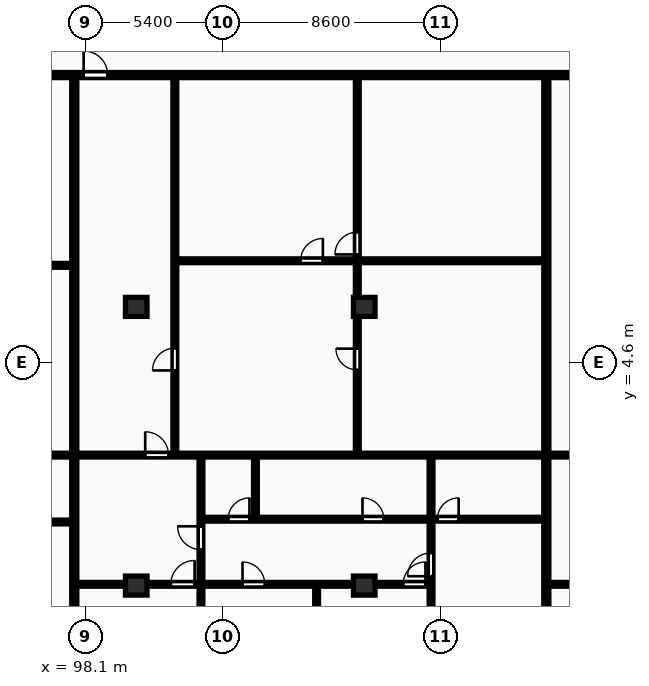
"""IFC4 building model, lengths in metres.
Left out: names, types, materials, properties, quantities, classifications, styles, units other than length and angle.
Written with IfcOpenShell. Run it as: python <this file> out.ifc"""

import sys

from ifc_helpers import new_model, si_unit, direction, frame, frame_2d, origin, origin_2d, place, context, subcontext, project, spatial, rectangle, extrude, element, fill, save


model = new_model("IFC4")
c1 = context("Model", 3, precision=1e-05, world=origin(), true_north=direction((0.0, 1.0)))
c2 = subcontext(c1, "Body", "Model", "MODEL_VIEW")
j1 = project(units=[si_unit("LENGTHUNIT", "METRE"), si_unit("PLANEANGLEUNIT", "RADIAN")], contexts=[c1])
p1 = place(None, origin())
s1 = spatial("IfcSite", under=j1, at=p1, CompositionType="ELEMENT")
p2 = place(p1, origin())
s2 = spatial("IfcBuilding", under=s1, at=p2, CompositionType="ELEMENT")
p3 = place(p2, frame((0.0, 0.0, 132.8)))
s3 = spatial("IfcBuildingStorey", under=s2, at=p3, CompositionType="ELEMENT", Elevation=132.8)
for number, where, z_axis, x_axis in (
    (1, (100.1, -4.2, 0.0), (0.0, 0.0, 1.0), (1.0, 0.0, 0.0)),
    (2, (100.1, 6.8, 0.0), (0.0, 0.0, 1.0), (1.0, 0.0, 0.0)),
    (3, (109.1, -4.2, 0.0), (0.0, 0.0, 1.0), (1.0, 0.0, 0.0)),
    (4, (109.1, 6.8, 0.0), (0.0, 0.0, 1.0), (1.0, 0.0, 0.0)),
):
    element("IfcColumn", number, at=place(p3, frame(where, z_axis=z_axis, x_axis=x_axis)), inside=s3, PredefinedType="COLUMN", context=c2, shape_type="SweptSolid", body=[
        extrude(rectangle(XDim=0.85, YDim=0.75, at=origin_2d()), origin(), (0.0, 0.0, 1.0), 3.25),
    ])
p4 = place(p3, frame((97.655, -8.7, 0.0), z_axis=(0.0, 0.0, 1.0), x_axis=(0.0, 1.0, 0.0)))
e5 = element("IfcWall", 5, at=p4, inside=s3, PredefinedType="PARTITIONING", context=c2, shape_type="SweptSolid", body=[
    extrude(rectangle(XDim=24.57, YDim=0.2, at=frame_2d((12.285, 0.0))), origin(), (0.0, 0.0, 1.0), 2.97),
])
p5 = place(p3, frame((76.73, 8.44, 0.0), z_axis=(0.0, 0.0, 1.0), x_axis=(1.0, 0.0, 0.0)))
e6 = element("IfcWall", 6, at=p5, inside=s3, PredefinedType="PARTITIONING", context=c2, shape_type="SweptSolid", body=[
    extrude(rectangle(XDim=20.844, YDim=0.15, at=frame_2d((10.422, 0.0))), origin(), (0.0, 0.0, 1.0), 2.97),
])
p6 = place(p5, frame((9.241, 0.0, 0.0)))
e7 = element("IfcOpeningElement", 7, at=p6, cuts=e6, PredefinedType="OPENING", context=c2, shape_type="SweptSolid", body=[
    extrude(rectangle(XDim=0.88, YDim=2.06, at=frame_2d((0.44, 1.03))), frame((0.0, 0.085, 0.0), z_axis=(0.0, -1.0, 0.0), x_axis=(1.0, 0.0, 0.0)), (0.0, 0.0, 1.0), 0.17),
])
p7 = place(p3, frame((77.53, -1.69, 0.0), z_axis=(0.0, 0.0, 1.0), x_axis=(1.0, 0.0, 0.0)))
e8 = element("IfcWall", 8, at=p7, inside=s3, PredefinedType="PARTITIONING", context=c2, shape_type="SweptSolid", body=[
    extrude(rectangle(XDim=20.044, YDim=0.15, at=frame_2d((10.022, 0.0))), origin(), (0.0, 0.0, 1.0), 2.97),
])
p8 = place(p7, frame((1.191, 0.0, 0.0)))
e9 = element("IfcOpeningElement", 9, at=p8, cuts=e8, PredefinedType="OPENING", context=c2, shape_type="SweptSolid", body=[
    extrude(rectangle(XDim=0.84, YDim=2.04, at=frame_2d((0.42, 1.02))), frame((0.0, 0.085, 0.0), z_axis=(0.0, -1.0, 0.0), x_axis=(1.0, 0.0, 0.0)), (0.0, 0.0, 1.0), 0.17),
])
p9 = place(p7, frame((9.602, 0.0, 0.0)))
e10 = element("IfcOpeningElement", 10, at=p9, cuts=e8, PredefinedType="OPENING", context=c2, shape_type="SweptSolid", body=[
    extrude(rectangle(XDim=0.84, YDim=2.04, at=frame_2d((0.42, 1.02))), frame((0.0, 0.085, 0.0), z_axis=(0.0, -1.0, 0.0), x_axis=(1.0, 0.0, 0.0)), (0.0, 0.0, 1.0), 0.17),
])
p10 = place(p7, frame((15.7, 0.0, 0.0)))
e11 = element("IfcOpeningElement", 11, at=p10, cuts=e8, PredefinedType="OPENING", context=c2, shape_type="SweptSolid", body=[
    extrude(rectangle(XDim=0.84, YDim=2.04, at=frame_2d((0.42, 1.02))), frame((0.0, 0.085, 0.0), z_axis=(0.0, -1.0, 0.0), x_axis=(1.0, 0.0, 0.0)), (0.0, 0.0, 1.0), 0.17),
])
p11 = place(p3, frame((72.78, 0.95, 0.0), z_axis=(0.0, 0.0, 1.0), x_axis=(1.0, 0.0, 0.0)))
e12 = element("IfcWall", 12, at=p11, inside=s3, PredefinedType="PARTITIONING", context=c2, shape_type="SweptSolid", body=[
    extrude(rectangle(XDim=24.794, YDim=0.15, at=frame_2d((12.397, 0.0))), origin(), (0.0, 0.0, 1.0), 2.97),
])
p12 = place(p11, frame((2.72, 0.0, 0.0)))
e13 = element("IfcOpeningElement", 13, at=p12, cuts=e12, PredefinedType="OPENING", context=c2, shape_type="SweptSolid", body=[
    extrude(rectangle(XDim=0.92, YDim=2.08, at=frame_2d((0.46, 1.04))), frame((0.0, 0.085, 0.0), z_axis=(0.0, -1.0, 0.0), x_axis=(1.0, 0.0, 0.0)), (0.0, 0.0, 1.0), 0.17),
])
p13 = place(p3, frame((116.286, -8.7, 0.0), z_axis=(0.0, 0.0, 1.0), x_axis=(0.0, 1.0, 0.0)))
e14 = element("IfcWall", 14, at=p13, inside=s3, PredefinedType="PARTITIONING", context=c2, shape_type="SweptSolid", body=[
    extrude(rectangle(XDim=24.57, YDim=0.2, at=frame_2d((12.285, 0.0))), origin(), (0.0, 0.0, 1.0), 2.97),
])
p14 = place(p3, frame((108.825, 0.99, 0.0), z_axis=(0.0, 0.0, 1.0), x_axis=(0.0, 1.0, 0.0)))
e15 = element("IfcWall", 15, at=p14, inside=s3, PredefinedType="PARTITIONING", context=c2, shape_type="SweptSolid", body=[
    extrude(rectangle(XDim=14.9, YDim=0.15, at=frame_2d((7.45, 0.0))), origin(), (0.0, 0.0, 1.0), 2.97),
])
p15 = place(p14, frame((3.321, 0.0, 0.0)))
e16 = element("IfcOpeningElement", 16, at=p15, cuts=e15, PredefinedType="OPENING", context=c2, shape_type="SweptSolid", body=[
    extrude(rectangle(XDim=0.84, YDim=2.04, at=frame_2d((0.42, 1.02))), frame((0.0, 0.085, 0.0), z_axis=(0.0, -1.0, 0.0), x_axis=(1.0, 0.0, 0.0)), (0.0, 0.0, 1.0), 0.17),
])
p16 = place(p14, frame((7.88, 0.0, 0.0)))
e17 = element("IfcOpeningElement", 17, at=p16, cuts=e15, PredefinedType="OPENING", context=c2, shape_type="SweptSolid", body=[
    extrude(rectangle(XDim=0.88, YDim=2.06, at=frame_2d((0.44, 1.03))), frame((0.0, 0.085, 0.0), z_axis=(0.0, -1.0, 0.0), x_axis=(1.0, 0.0, 0.0)), (0.0, 0.0, 1.0), 0.17),
])
p17 = place(p3, frame((101.685, 8.62, 0.0), z_axis=(0.0, 0.0, 1.0), x_axis=(1.0, 0.0, 0.0)))
e18 = element("IfcWall", 18, at=p17, inside=s3, PredefinedType="PARTITIONING", context=c2, shape_type="SweptSolid", body=[
    extrude(rectangle(XDim=14.522, YDim=0.15, at=frame_2d((7.261, 0.0))), origin(), (0.0, 0.0, 1.0), 2.97),
])
p18 = place(p17, frame((4.903, 0.0, 0.0)))
e19 = element("IfcOpeningElement", 19, at=p18, cuts=e18, PredefinedType="OPENING", context=c2, shape_type="SweptSolid", body=[
    extrude(rectangle(XDim=0.88, YDim=2.06, at=frame_2d((0.44, 1.03))), frame((0.0, 0.085, 0.0), z_axis=(0.0, -1.0, 0.0), x_axis=(1.0, 0.0, 0.0)), (0.0, 0.0, 1.0), 0.17),
])
p19 = place(p3, frame((101.625, 0.99, 0.0), z_axis=(0.0, 0.0, 1.0), x_axis=(0.0, 1.0, 0.0)))
e20 = element("IfcWall", 20, at=p19, inside=s3, PredefinedType="PARTITIONING", context=c2, shape_type="SweptSolid", body=[
    extrude(rectangle(XDim=14.9, YDim=0.15, at=frame_2d((7.45, 0.0))), origin(), (0.0, 0.0, 1.0), 2.97),
])
p20 = place(p19, frame((3.302, 0.0, 0.0)))
e21 = element("IfcOpeningElement", 21, at=p20, cuts=e20, PredefinedType="OPENING", context=c2, shape_type="SweptSolid", body=[
    extrude(rectangle(XDim=0.88, YDim=2.06, at=frame_2d((0.44, 1.03))), frame((0.0, 0.085, 0.0), z_axis=(0.0, -1.0, 0.0), x_axis=(1.0, 0.0, 0.0)), (0.0, 0.0, 1.0), 0.17),
])
p21 = place(p3, frame((104.804, -1.56, 0.0), z_axis=(0.0, 0.0, 1.0), x_axis=(0.0, 1.0, 0.0)))
e22 = element("IfcWall", 22, at=p21, inside=s3, PredefinedType="PARTITIONING", context=c2, shape_type="SweptSolid", body=[
    extrude(rectangle(XDim=2.47, YDim=0.15, at=frame_2d((1.235, 0.0))), origin(), (0.0, 0.0, 1.0), 2.97),
])
p22 = place(p3, frame((107.22, -8.7, 0.0), z_axis=(0.0, 0.0, 1.0), x_axis=(0.0, 1.0, 0.0)))
e23 = element("IfcWall", 23, at=p22, inside=s3, PredefinedType="PARTITIONING", context=c2, shape_type="SweptSolid", body=[
    extrude(rectangle(XDim=4.47, YDim=0.15, at=frame_2d((2.235, 0.0))), origin(), (0.0, 0.0, 1.0), 2.97),
])
p23 = place(p3, frame((102.655, -8.7, 0.0), z_axis=(0.0, 0.0, 1.0), x_axis=(0.0, 1.0, 0.0)))
e24 = element("IfcWall", 24, at=p23, inside=s3, PredefinedType="PARTITIONING", context=c2, shape_type="SweptSolid", body=[
    extrude(rectangle(XDim=9.61, YDim=0.15, at=frame_2d((4.805, 0.0))), origin(), (0.0, 0.0, 1.0), 2.97),
])
p24 = place(p23, frame((5.92, 0.0, 0.0)))
e25 = element("IfcOpeningElement", 25, at=p24, cuts=e24, PredefinedType="OPENING", context=c2, shape_type="SweptSolid", body=[
    extrude(rectangle(XDim=0.92, YDim=2.08, at=frame_2d((0.46, 1.04))), frame((0.0, 0.085, 0.0), z_axis=(0.0, -1.0, 0.0), x_axis=(1.0, 0.0, 0.0)), (0.0, 0.0, 1.0), 0.17),
])
p25 = place(p3, frame((111.736, -1.56, 0.0), z_axis=(0.0, 0.0, 1.0), x_axis=(0.0, 1.0, 0.0)))
e26 = element("IfcWall", 26, at=p25, inside=s3, PredefinedType="PARTITIONING", context=c2, shape_type="SweptSolid", body=[
    extrude(rectangle(XDim=2.47, YDim=0.15, at=frame_2d((1.235, 0.0))), origin(), (0.0, 0.0, 1.0), 2.97),
])
p26 = place(p3, frame((111.736, -8.7, 0.0), z_axis=(0.0, 0.0, 1.0), x_axis=(0.0, 1.0, 0.0)))
e27 = element("IfcWall", 27, at=p26, inside=s3, PredefinedType="PARTITIONING", context=c2, shape_type="SweptSolid", body=[
    extrude(rectangle(XDim=7.1, YDim=0.15, at=frame_2d((3.55, 0.0))), origin(), (0.0, 0.0, 1.0), 2.97),
])
p27 = place(p26, frame((4.87, 0.0, 0.0)))
e28 = element("IfcOpeningElement", 28, at=p27, cuts=e27, PredefinedType="OPENING", context=c2, shape_type="SweptSolid", body=[
    extrude(rectangle(XDim=0.92, YDim=2.08, at=frame_2d((0.46, 1.04))), frame((0.0, 0.085, 0.0), z_axis=(0.0, -1.0, 0.0), x_axis=(1.0, 0.0, 0.0)), (0.0, 0.0, 1.0), 0.17),
])
p28 = place(p3, frame((102.695, -1.58, 0.0), z_axis=(0.0, 0.0, 1.0), x_axis=(1.0, 0.0, 0.0)))
e29 = element("IfcWall", 29, at=p28, inside=s3, PredefinedType="PARTITIONING", context=c2, shape_type="SweptSolid", body=[
    extrude(rectangle(XDim=13.512, YDim=0.15, at=frame_2d((6.756, 0.0))), origin(), (0.0, 0.0, 1.0), 2.97),
])
p29 = place(p28, frame((1.034, 0.0, 0.0)))
e30 = element("IfcOpeningElement", 30, at=p29, cuts=e29, PredefinedType="OPENING", context=c2, shape_type="SweptSolid", body=[
    extrude(rectangle(XDim=0.84, YDim=2.04, at=frame_2d((0.42, 1.02))), frame((0.0, 0.085, 0.0), z_axis=(0.0, -1.0, 0.0), x_axis=(1.0, 0.0, 0.0)), (0.0, 0.0, 1.0), 0.17),
])
p30 = place(p28, frame((6.336, 0.0, 0.0)))
e31 = element("IfcOpeningElement", 31, at=p30, cuts=e29, PredefinedType="OPENING", context=c2, shape_type="SweptSolid", body=[
    extrude(rectangle(XDim=0.84, YDim=2.04, at=frame_2d((0.42, 1.02))), frame((0.0, 0.085, 0.0), z_axis=(0.0, -1.0, 0.0), x_axis=(1.0, 0.0, 0.0)), (0.0, 0.0, 1.0), 0.17),
])
p31 = place(p28, frame((9.292, 0.0, 0.0)))
e32 = element("IfcOpeningElement", 32, at=p31, cuts=e29, PredefinedType="OPENING", context=c2, shape_type="SweptSolid", body=[
    extrude(rectangle(XDim=0.84, YDim=2.04, at=frame_2d((0.42, 1.02))), frame((0.0, 0.085, 0.0), z_axis=(0.0, -1.0, 0.0), x_axis=(1.0, 0.0, 0.0)), (0.0, 0.0, 1.0), 0.17),
])
p32 = place(p3, frame((97.735, 0.95, 0.0), z_axis=(0.0, 0.0, 1.0), x_axis=(1.0, 0.0, 0.0)))
e33 = element("IfcWall", 33, at=p32, inside=s3, PredefinedType="PARTITIONING", context=c2, shape_type="SweptSolid", body=[
    extrude(rectangle(XDim=18.472, YDim=0.15, at=frame_2d((9.236, 0.0))), origin(), (0.0, 0.0, 1.0), 2.97),
])
p33 = place(p32, frame((2.72, 0.0, 0.0)))
e34 = element("IfcOpeningElement", 34, at=p33, cuts=e33, PredefinedType="OPENING", context=c2, shape_type="SweptSolid", body=[
    extrude(rectangle(XDim=0.92, YDim=2.08, at=frame_2d((0.46, 1.04))), frame((0.0, 0.085, 0.0), z_axis=(0.0, -1.0, 0.0), x_axis=(1.0, 0.0, 0.0)), (0.0, 0.0, 1.0), 0.17),
])
p34 = place(p3, frame((97.735, -4.15, 0.0), z_axis=(0.0, 0.0, 1.0), x_axis=(1.0, 0.0, 0.0)))
e35 = element("IfcWall", 35, at=p34, inside=s3, PredefinedType="PARTITIONING", context=c2, shape_type="SweptSolid", body=[
    extrude(rectangle(XDim=14.002, YDim=0.15, at=frame_2d((7.001, 0.0))), origin(), (0.0, 0.0, 1.0), 2.663),
])
p35 = place(p34, frame((3.73, 0.0, 0.0)))
e36 = element("IfcOpeningElement", 36, at=p35, cuts=e35, PredefinedType="OPENING", context=c2, shape_type="SweptSolid", body=[
    extrude(rectangle(XDim=0.94, YDim=2.1, at=frame_2d((0.47, 1.05))), frame((0.0, 0.085, 0.0), z_axis=(0.0, -1.0, 0.0), x_axis=(1.0, 0.0, 0.0)), (0.0, 0.0, 1.0), 0.17),
])
p36 = place(p34, frame((6.561, 0.0, 0.0)))
e37 = element("IfcOpeningElement", 37, at=p36, cuts=e35, PredefinedType="OPENING", context=c2, shape_type="SweptSolid", body=[
    extrude(rectangle(XDim=0.88, YDim=2.06, at=frame_2d((0.44, 1.03))), frame((0.0, 0.085, 0.0), z_axis=(0.0, -1.0, 0.0), x_axis=(1.0, 0.0, 0.0)), (0.0, 0.0, 1.0), 0.17),
])
p37 = place(p34, frame((12.902, 0.0, 0.0)))
e38 = element("IfcOpeningElement", 38, at=p37, cuts=e35, PredefinedType="OPENING", context=c2, shape_type="SweptSolid", body=[
    extrude(rectangle(XDim=0.88, YDim=2.06, at=frame_2d((0.44, 1.03))), frame((0.0, 0.085, 0.0), z_axis=(0.0, -1.0, 0.0), x_axis=(1.0, 0.0, 0.0)), (0.0, 0.0, 1.0), 0.17),
])
p38 = place(p3, frame((116.366, 0.95, 0.0), z_axis=(0.0, 0.0, 1.0), x_axis=(1.0, 0.0, 0.0)))
e39 = element("IfcWall", 39, at=p38, inside=s3, PredefinedType="PARTITIONING", context=c2, shape_type="SweptSolid", body=[
    extrude(rectangle(XDim=14.254, YDim=0.15, at=frame_2d((7.127, 0.0))), origin(), (0.0, 0.0, 1.0), 2.97),
])
p39 = place(p38, frame((2.72, 0.0, 0.0)))
e40 = element("IfcOpeningElement", 40, at=p39, cuts=e39, PredefinedType="OPENING", context=c2, shape_type="SweptSolid", body=[
    extrude(rectangle(XDim=0.92, YDim=2.08, at=frame_2d((0.46, 1.04))), frame((0.0, 0.085, 0.0), z_axis=(0.0, -1.0, 0.0), x_axis=(1.0, 0.0, 0.0)), (0.0, 0.0, 1.0), 0.17),
])
p40 = place(p3, frame((116.366, -4.15, 0.0), z_axis=(0.0, 0.0, 1.0), x_axis=(1.0, 0.0, 0.0)))
e41 = element("IfcWall", 41, at=p40, inside=s3, PredefinedType="PARTITIONING", context=c2, shape_type="SweptSolid", body=[
    extrude(rectangle(XDim=14.254, YDim=0.15, at=frame_2d((7.127, 0.0))), origin(), (0.0, 0.0, 1.0), 2.663),
])
p41 = place(p40, frame((4.673, 0.0, 0.0)))
e42 = element("IfcOpeningElement", 42, at=p41, cuts=e41, PredefinedType="OPENING", context=c2, shape_type="SweptSolid", body=[
    extrude(rectangle(XDim=0.94, YDim=2.1, at=frame_2d((0.47, 1.05))), frame((0.0, 0.085, 0.0), z_axis=(0.0, -1.0, 0.0), x_axis=(1.0, 0.0, 0.0)), (0.0, 0.0, 1.0), 0.17),
])
p42 = place(p3, frame((72.7, 15.95, 0.0), z_axis=(0.0, 0.0, 1.0), x_axis=(1.0, 0.0, 0.0)))
e43 = element("IfcWall", 43, at=p42, inside=s3, PredefinedType="PARTITIONING", context=c2, shape_type="SweptSolid", body=[
    extrude(rectangle(XDim=58.0, YDim=0.2, at=frame_2d((29.0, 0.0))), origin(), (0.0, 0.0, 1.0), 2.97),
])
p43 = place(p42, frame((2.77, 0.0, 0.0)))
e44 = element("IfcOpeningElement", 44, at=p43, cuts=e43, PredefinedType="OPENING", context=c2, shape_type="SweptSolid", body=[
    extrude(rectangle(XDim=0.95, YDim=2.15, at=frame_2d((0.475, 1.075))), frame((0.0, 0.11, 0.0), z_axis=(0.0, -1.0, 0.0), x_axis=(1.0, 0.0, 0.0)), (0.0, 0.0, 1.0), 0.22),
])
p44 = place(p42, frame((25.324, 0.0, 0.0)))
e45 = element("IfcOpeningElement", 45, at=p44, cuts=e43, PredefinedType="OPENING", context=c2, shape_type="SweptSolid", body=[
    extrude(rectangle(XDim=0.95, YDim=2.15, at=frame_2d((0.475, 1.075))), frame((0.0, 0.11, 0.0), z_axis=(0.0, -1.0, 0.0), x_axis=(1.0, 0.0, 0.0)), (0.0, 0.0, 1.0), 0.22),
])
p45 = place(p42, frame((46.356, 0.0, 0.0)))
e46 = element("IfcOpeningElement", 46, at=p45, cuts=e43, PredefinedType="OPENING", context=c2, shape_type="SweptSolid", body=[
    extrude(rectangle(XDim=0.95, YDim=2.15, at=frame_2d((0.475, 1.075))), frame((0.0, 0.11, 0.0), z_axis=(0.0, -1.0, 0.0), x_axis=(1.0, 0.0, 0.0)), (0.0, 0.0, 1.0), 0.22),
])
p46 = place(p15, origin())
e47 = element("IfcDoor", 47, at=p46, inside=s3, OperationType="SINGLE_SWING_RIGHT", PredefinedType="DOOR", context=c2, shape_type="SweptSolid", body=[
    extrude(rectangle(XDim=0.84, YDim=2.04, at=frame_2d((0.42, 1.02))), frame((0.0, 0.025, 0.0), z_axis=(0.0, -1.0, 0.0), x_axis=(1.0, 0.0, 0.0)), (0.0, 0.0, 1.0), 0.05),
])
fill(e16, e47)
p47 = place(p16, origin())
e48 = element("IfcDoor", 48, at=p47, inside=s3, OperationType="SINGLE_SWING_LEFT", PredefinedType="DOOR", context=c2, shape_type="SweptSolid", body=[
    extrude(rectangle(XDim=0.88, YDim=2.06, at=frame_2d((0.44, 1.03))), frame((0.0, 0.025, 0.0), z_axis=(0.0, -1.0, 0.0), x_axis=(1.0, 0.0, 0.0)), (0.0, 0.0, 1.0), 0.05),
])
fill(e17, e48)
p48 = place(p18, origin())
e49 = element("IfcDoor", 49, at=p48, inside=s3, OperationType="SINGLE_SWING_RIGHT", PredefinedType="DOOR", context=c2, shape_type="SweptSolid", body=[
    extrude(rectangle(XDim=0.88, YDim=2.06, at=frame_2d((0.44, 1.03))), frame((0.0, 0.025, 0.0), z_axis=(0.0, -1.0, 0.0), x_axis=(1.0, 0.0, 0.0)), (0.0, 0.0, 1.0), 0.05),
])
fill(e19, e49)
p49 = place(p20, origin())
e50 = element("IfcDoor", 50, at=p49, inside=s3, OperationType="SINGLE_SWING_LEFT", PredefinedType="DOOR", context=c2, shape_type="SweptSolid", body=[
    extrude(rectangle(XDim=0.88, YDim=2.06, at=frame_2d((0.44, 1.03))), frame((0.0, 0.025, 0.0), z_axis=(0.0, -1.0, 0.0), x_axis=(1.0, 0.0, 0.0)), (0.0, 0.0, 1.0), 0.05),
])
fill(e21, e50)
p50 = place(p24, origin())
e51 = element("IfcDoor", 51, at=p50, inside=s3, OperationType="SINGLE_SWING_RIGHT", PredefinedType="DOOR", context=c2, shape_type="SweptSolid", body=[
    extrude(rectangle(XDim=0.92, YDim=2.08, at=frame_2d((0.46, 1.04))), frame((0.0, 0.025, 0.0), z_axis=(0.0, -1.0, 0.0), x_axis=(1.0, 0.0, 0.0)), (0.0, 0.0, 1.0), 0.05),
])
fill(e25, e51)
p51 = place(p27, origin())
e52 = element("IfcDoor", 52, at=p51, inside=s3, OperationType="SINGLE_SWING_LEFT", PredefinedType="DOOR", context=c2, shape_type="SweptSolid", body=[
    extrude(rectangle(XDim=0.92, YDim=2.08, at=frame_2d((0.46, 1.04))), frame((0.0, 0.025, 0.0), z_axis=(0.0, -1.0, 0.0), x_axis=(1.0, 0.0, 0.0)), (0.0, 0.0, 1.0), 0.05),
])
fill(e28, e52)
p52 = place(p29, origin())
e53 = element("IfcDoor", 53, at=p52, inside=s3, OperationType="SINGLE_SWING_RIGHT", PredefinedType="DOOR", context=c2, shape_type="SweptSolid", body=[
    extrude(rectangle(XDim=0.84, YDim=2.04, at=frame_2d((0.42, 1.02))), frame((0.0, 0.025, 0.0), z_axis=(0.0, -1.0, 0.0), x_axis=(1.0, 0.0, 0.0)), (0.0, 0.0, 1.0), 0.05),
])
fill(e30, e53)
p53 = place(p30, origin())
e54 = element("IfcDoor", 54, at=p53, inside=s3, OperationType="SINGLE_SWING_LEFT", PredefinedType="DOOR", context=c2, shape_type="SweptSolid", body=[
    extrude(rectangle(XDim=0.84, YDim=2.04, at=frame_2d((0.42, 1.02))), frame((0.0, 0.025, 0.0), z_axis=(0.0, -1.0, 0.0), x_axis=(1.0, 0.0, 0.0)), (0.0, 0.0, 1.0), 0.05),
])
fill(e31, e54)
p54 = place(p31, origin())
e55 = element("IfcDoor", 55, at=p54, inside=s3, OperationType="SINGLE_SWING_RIGHT", PredefinedType="DOOR", context=c2, shape_type="SweptSolid", body=[
    extrude(rectangle(XDim=0.84, YDim=2.04, at=frame_2d((0.42, 1.02))), frame((0.0, 0.025, 0.0), z_axis=(0.0, -1.0, 0.0), x_axis=(1.0, 0.0, 0.0)), (0.0, 0.0, 1.0), 0.05),
])
fill(e32, e55)
p55 = place(p33, origin())
e56 = element("IfcDoor", 56, at=p55, inside=s3, OperationType="SINGLE_SWING_LEFT", PredefinedType="DOOR", context=c2, shape_type="SweptSolid", body=[
    extrude(rectangle(XDim=0.92, YDim=2.08, at=frame_2d((0.46, 1.04))), frame((0.0, 0.025, 0.0), z_axis=(0.0, -1.0, 0.0), x_axis=(1.0, 0.0, 0.0)), (0.0, 0.0, 1.0), 0.05),
])
fill(e34, e56)
p56 = place(p35, origin())
e57 = element("IfcDoor", 57, at=p56, inside=s3, OperationType="SINGLE_SWING_RIGHT", PredefinedType="DOOR", context=c2, shape_type="SweptSolid", body=[
    extrude(rectangle(XDim=0.94, YDim=2.1, at=frame_2d((0.47, 1.05))), frame((0.0, 0.025, 0.0), z_axis=(0.0, -1.0, 0.0), x_axis=(1.0, 0.0, 0.0)), (0.0, 0.0, 1.0), 0.05),
])
fill(e36, e57)
p57 = place(p36, origin())
e58 = element("IfcDoor", 58, at=p57, inside=s3, OperationType="SINGLE_SWING_LEFT", PredefinedType="DOOR", context=c2, shape_type="SweptSolid", body=[
    extrude(rectangle(XDim=0.88, YDim=2.06, at=frame_2d((0.44, 1.03))), frame((0.0, 0.025, 0.0), z_axis=(0.0, -1.0, 0.0), x_axis=(1.0, 0.0, 0.0)), (0.0, 0.0, 1.0), 0.05),
])
fill(e37, e58)
p58 = place(p37, origin())
e59 = element("IfcDoor", 59, at=p58, inside=s3, OperationType="SINGLE_SWING_RIGHT", PredefinedType="DOOR", context=c2, shape_type="SweptSolid", body=[
    extrude(rectangle(XDim=0.88, YDim=2.06, at=frame_2d((0.44, 1.03))), frame((0.0, 0.025, 0.0), z_axis=(0.0, -1.0, 0.0), x_axis=(1.0, 0.0, 0.0)), (0.0, 0.0, 1.0), 0.05),
])
fill(e38, e59)
p59 = place(p44, origin())
e60 = element("IfcDoor", 60, at=p59, inside=s3, OperationType="SINGLE_SWING_LEFT", PredefinedType="DOOR", context=c2, shape_type="SweptSolid", body=[
    extrude(rectangle(XDim=0.95, YDim=2.15, at=frame_2d((0.475, 1.075))), frame((0.0, 0.025, 0.0), z_axis=(0.0, -1.0, 0.0), x_axis=(1.0, 0.0, 0.0)), (0.0, 0.0, 1.0), 0.05),
])
fill(e45, e60)
save(model, sys.argv[1])
